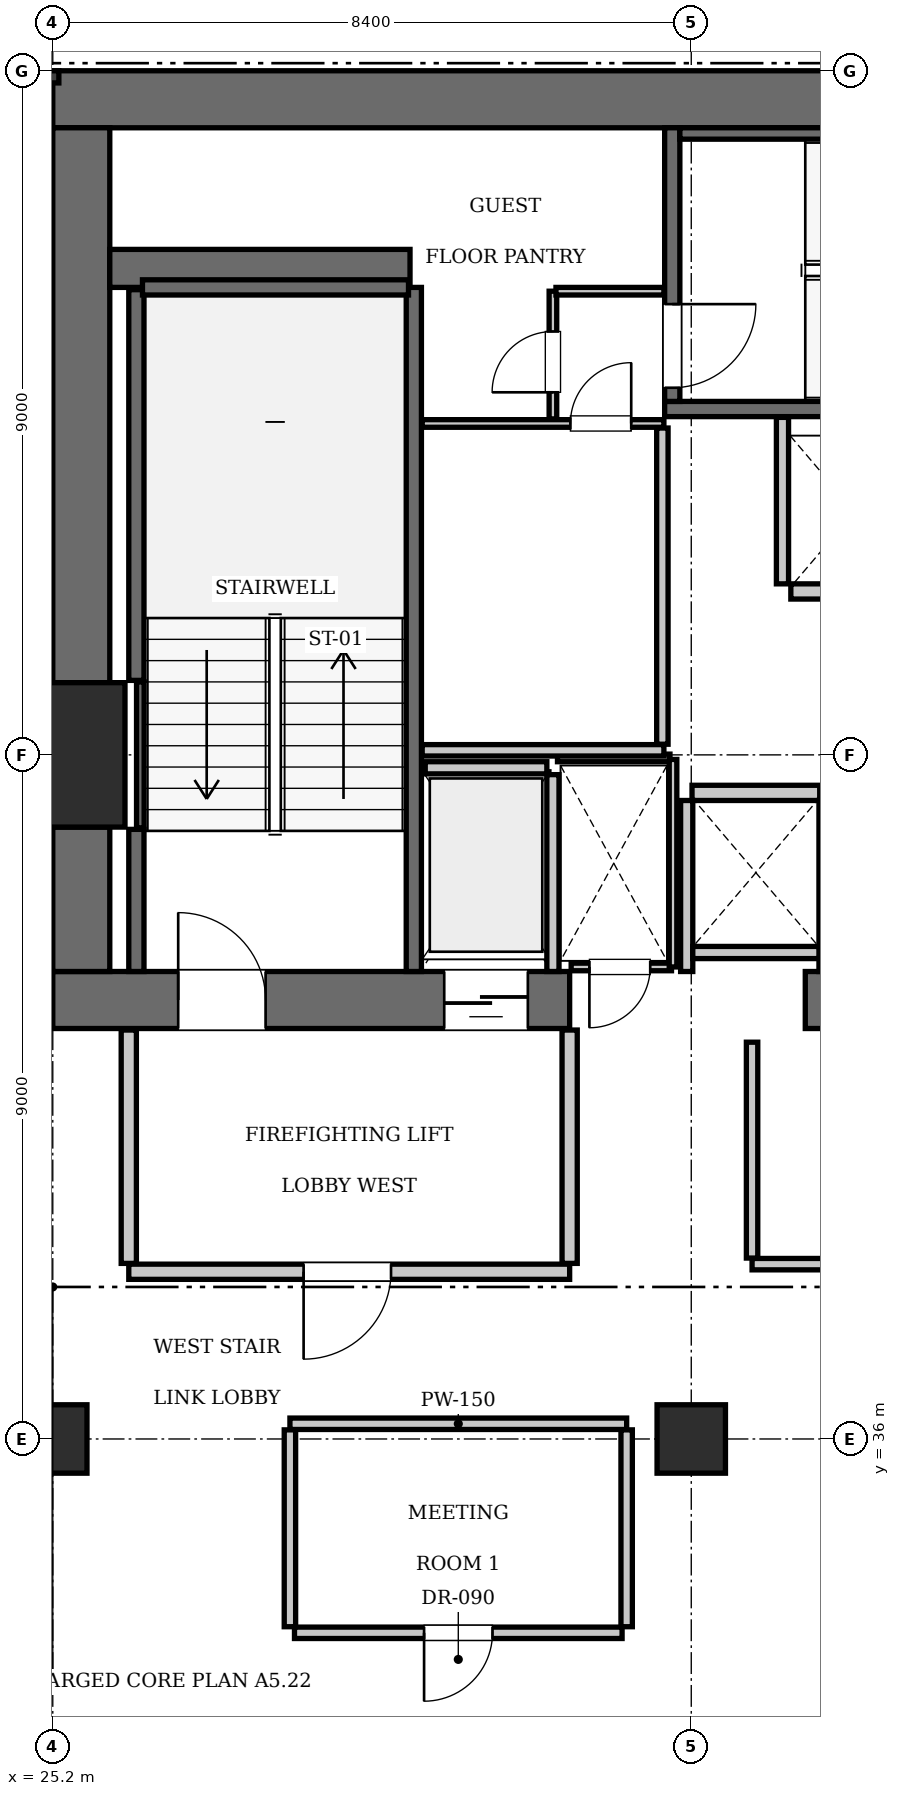
"""IFC4 building model, lengths in metres.
Left out: names, types, materials, properties, quantities, classifications, styles, units other than length and angle.
Written with IfcOpenShell. Run it as: python <this file> out.ifc"""

import sys

from ifc_helpers import new_model, si_unit, direction, frame, frame_2d, origin, origin_2d, place, context, subcontext, project, spatial, rectangle, extrude, element, fill, save


model = new_model("IFC4")
c1 = context("Model", 3, precision=1e-05, world=origin(), true_north=direction((0.0, 1.0)))
c2 = subcontext(c1, "Body", "Model", "MODEL_VIEW")
j1 = project(units=[si_unit("LENGTHUNIT", "METRE"), si_unit("PLANEANGLEUNIT", "RADIAN")], contexts=[c1])
p1 = place(None, origin())
s1 = spatial("IfcSite", under=j1, at=p1, CompositionType="ELEMENT")
p2 = place(p1, origin())
s2 = spatial("IfcBuilding", under=s1, at=p2, CompositionType="ELEMENT")
p3 = place(p2, frame((0.0, 0.0, 181.3)))
s3 = spatial("IfcBuildingStorey", under=s2, at=p3, CompositionType="ELEMENT", Elevation=181.3)
p4 = place(p3, frame((25.2, 45.0, 0.0), z_axis=(0.0, 0.0, 1.0), x_axis=(1.0, 0.0, 0.0)))
e1 = element("IfcColumn", 1, at=p4, inside=s3, PredefinedType="COLUMN", context=c2, shape_type="SweptSolid", body=[
    extrude(rectangle(XDim=1.9, YDim=1.9, at=origin_2d()), origin(), (0.0, 0.0, 1.0), 3.85),
])
p5 = place(p3, frame((25.2, 53.625, 0.0), z_axis=(0.0, 0.0, 1.0), x_axis=(1.0, 0.0, 0.0)))
e2 = element("IfcWall", 2, at=p5, inside=s3, PredefinedType="SHEAR", context=c2, shape_type="SweptSolid", body=[
    extrude(rectangle(XDim=25.2, YDim=0.75, at=frame_2d((12.6, 0.0))), origin(), (0.0, 0.0, 1.0), 3.85),
])
p6 = place(p3, frame((25.2, 41.775, 0.0), z_axis=(0.0, 0.0, 1.0), x_axis=(1.0, 0.0, 0.0)))
e3 = element("IfcWall", 3, at=p6, inside=s3, PredefinedType="SHEAR", context=c2, shape_type="SweptSolid", body=[
    extrude(rectangle(XDim=6.8, YDim=0.75, at=frame_2d((3.4, 0.0))), origin(), (0.0, 0.0, 1.0), 3.85),
])
p7 = place(p6, frame((1.65, 0.0, 0.0)))
e4 = element("IfcOpeningElement", 4, at=p7, cuts=e3, PredefinedType="OPENING", context=c2, shape_type="SweptSolid", body=[
    extrude(rectangle(XDim=1.15, YDim=2.15, at=frame_2d((0.575, 1.075))), frame((0.0, 0.385, 0.0), z_axis=(0.0, -1.0, 0.0), x_axis=(1.0, 0.0, 0.0)), (0.0, 0.0, 1.0), 0.77),
])
p8 = place(p6, frame((5.15, 0.0, 0.0)))
e5 = element("IfcOpeningElement", 5, at=p8, cuts=e3, PredefinedType="OPENING", context=c2, shape_type="SweptSolid", body=[
    extrude(rectangle(XDim=1.1, YDim=2.2, at=frame_2d((0.55, 1.1))), frame((0.0, 0.385, 0.0), z_axis=(0.0, -1.0, 0.0), x_axis=(1.0, 0.0, 0.0)), (0.0, 0.0, 1.0), 0.77),
])
p9 = place(p3, frame((35.1, 41.775, 0.0), z_axis=(0.0, 0.0, 1.0), x_axis=(1.0, 0.0, 0.0)))
e6 = element("IfcWall", 6, at=p9, inside=s3, PredefinedType="SHEAR", context=c2, shape_type="SweptSolid", body=[
    extrude(rectangle(XDim=5.4, YDim=0.75, at=frame_2d((2.7, 0.0))), origin(), (0.0, 0.0, 1.0), 3.85),
])
p10 = place(p3, frame((25.575, 42.15, 0.0), z_axis=(0.0, 0.0, 1.0), x_axis=(0.0, 1.0, 0.0)))
e7 = element("IfcWall", 7, at=p10, inside=s3, PredefinedType="SHEAR", context=c2, shape_type="SweptSolid", body=[
    extrude(rectangle(XDim=1.9, YDim=0.75, at=frame_2d((0.95, 0.0))), origin(), (0.0, 0.0, 1.0), 3.85),
])
p11 = place(p3, frame((25.575, 45.95, 0.0), z_axis=(0.0, 0.0, 1.0), x_axis=(0.0, 1.0, 0.0)))
e8 = element("IfcWall", 8, at=p11, inside=s3, PredefinedType="SHEAR", context=c2, shape_type="SweptSolid", body=[
    extrude(rectangle(XDim=7.3, YDim=0.75, at=frame_2d((3.65, 0.0))), origin(), (0.0, 0.0, 1.0), 3.85),
])
p12 = place(p3, frame((25.95, 51.4, 0.0), z_axis=(0.0, 0.0, 1.0), x_axis=(1.0, 0.0, 0.0)))
e9 = element("IfcWall", 9, at=p12, inside=s3, PredefinedType="SHEAR", context=c2, shape_type="SweptSolid", body=[
    extrude(rectangle(XDim=3.95, YDim=0.5, at=frame_2d((1.975, 0.0))), origin(), (0.0, 0.0, 1.0), 3.85),
])
for number, where, z_axis, x_axis in (
    (10, (25.2, 36.0, 0.0), (0.0, 0.0, 1.0), (1.0, 0.0, 0.0)),
    (11, (33.6, 36.0, 0.0), (0.0, 0.0, 1.0), (1.0, 0.0, 0.0)),
):
    element("IfcColumn", number, at=place(p3, frame(where, z_axis=z_axis, x_axis=x_axis)), inside=s3, PredefinedType="COLUMN", context=c2, shape_type="SweptSolid", body=[
        extrude(rectangle(XDim=0.9, YDim=0.9, at=origin_2d()), origin(), (0.0, 0.0, 1.0), 3.85),
    ])
p13 = place(p3, frame((29.95, 42.15, 0.0), z_axis=(0.0, 0.0, 1.0), x_axis=(0.0, 1.0, 0.0)))
e12 = element("IfcWall", 12, at=p13, inside=s3, PredefinedType="SOLIDWALL", context=c2, shape_type="SweptSolid", body=[
    extrude(rectangle(XDim=9.0, YDim=0.2, at=frame_2d((4.5, 0.0))), origin(), (0.0, 0.0, 1.0), 3.61),
])
p14 = place(p3, frame((26.3, 42.15, 0.0), z_axis=(0.0, 0.0, 1.0), x_axis=(0.0, 1.0, 0.0)))
e13 = element("IfcWall", 13, at=p14, inside=s3, PredefinedType="SOLIDWALL", context=c2, shape_type="SweptSolid", body=[
    extrude(rectangle(XDim=1.87, YDim=0.2, at=frame_2d((0.935, 0.0))), origin(), (0.0, 0.0, 1.0), 3.61),
])
p15 = place(p3, frame((26.3, 45.98, 0.0), z_axis=(0.0, 0.0, 1.0), x_axis=(0.0, 1.0, 0.0)))
e14 = element("IfcWall", 14, at=p15, inside=s3, PredefinedType="SOLIDWALL", context=c2, shape_type="SweptSolid", body=[
    extrude(rectangle(XDim=5.14, YDim=0.2, at=frame_2d((2.57, 0.0))), origin(), (0.0, 0.0, 1.0), 3.61),
])
p16 = place(p3, frame((26.38, 51.15, 0.0), z_axis=(0.0, 0.0, 1.0), x_axis=(1.0, 0.0, 0.0)))
e15 = element("IfcWall", 15, at=p16, inside=s3, PredefinedType="SOLIDWALL", context=c2, shape_type="SweptSolid", body=[
    extrude(rectangle(XDim=3.5, YDim=0.2, at=frame_2d((1.75, 0.0))), origin(), (0.0, 0.0, 1.0), 3.61),
])
p17 = place(p3, frame((26.352, 44.04, 0.0), z_axis=(0.0, 0.0, 1.0), x_axis=(0.0, 1.0, 0.0)))
e16 = element("IfcWall", 16, at=p17, inside=s3, PredefinedType="SOLIDWALL", context=c2, shape_type="SweptSolid", body=[
    extrude(rectangle(XDim=1.92, YDim=0.1, at=frame_2d((0.96, 0.0))), origin(), (0.0, 0.0, 1.0), 3.61),
])
p18 = place(p3, frame((33.25, 49.55, 0.0), z_axis=(0.0, 0.0, 1.0), x_axis=(1.0, 0.0, 0.0)))
e17 = element("IfcWall", 17, at=p18, inside=s3, PredefinedType="SOLIDWALL", context=c2, shape_type="SweptSolid", body=[
    extrude(rectangle(XDim=9.1, YDim=0.2, at=frame_2d((4.55, 0.0))), origin(), (0.0, 0.0, 1.0), 3.61),
])
p19 = place(p3, frame((33.35, 49.65, 0.0), z_axis=(0.0, 0.0, 1.0), x_axis=(0.0, 1.0, 0.0)))
e18 = element("IfcWall", 18, at=p19, inside=s3, PredefinedType="SOLIDWALL", context=c2, shape_type="SweptSolid", body=[
    extrude(rectangle(XDim=3.6, YDim=0.2, at=frame_2d((1.8, 0.0))), origin(), (0.0, 0.0, 1.0), 3.61),
])
p20 = place(p19, frame((0.18, 0.0, 0.0)))
e19 = element("IfcOpeningElement", 19, at=p20, cuts=e18, PredefinedType="OPENING", context=c2, shape_type="SweptSolid", body=[
    extrude(rectangle(XDim=1.1, YDim=2.15, at=frame_2d((0.55, 1.075))), frame((0.0, 0.11, 0.0), z_axis=(0.0, -1.0, 0.0), x_axis=(1.0, 0.0, 0.0)), (0.0, 0.0, 1.0), 0.22),
])
p21 = place(p3, frame((33.45, 53.175, 0.0), z_axis=(0.0, 0.0, 1.0), x_axis=(1.0, 0.0, 0.0)))
e20 = element("IfcWall", 20, at=p21, inside=s3, PredefinedType="SOLIDWALL", context=c2, shape_type="SweptSolid", body=[
    extrude(rectangle(XDim=8.7, YDim=0.15, at=frame_2d((4.35, 0.0))), origin(), (0.0, 0.0, 1.0), 3.61),
])
p22 = place(p3, frame((34.91, 47.15, 0.0), z_axis=(0.0, 0.0, 1.0), x_axis=(1.0, 0.0, 0.0)))
e21 = element("IfcWall", 21, at=p22, inside=s3, PredefinedType="SOLIDWALL", context=c2, shape_type="SweptSolid", body=[
    extrude(rectangle(XDim=1.68, YDim=0.2, at=frame_2d((0.84, 0.0))), origin(), (0.0, 0.0, 1.0), 3.61),
])
p23 = place(p3, frame((33.61, 44.5, 0.0), z_axis=(0.0, 0.0, 1.0), x_axis=(1.0, 0.0, 0.0)))
e22 = element("IfcWall", 22, at=p23, inside=s3, PredefinedType="SOLIDWALL", context=c2, shape_type="SweptSolid", body=[
    extrude(rectangle(XDim=1.68, YDim=0.2, at=frame_2d((0.84, 0.0))), origin(), (0.0, 0.0, 1.0), 3.61),
])
p24 = place(p3, frame((30.1, 44.83, 0.0), z_axis=(0.0, 0.0, 1.0), x_axis=(1.0, 0.0, 0.0)))
e23 = element("IfcWall", 23, at=p24, inside=s3, PredefinedType="SOLIDWALL", context=c2, shape_type="SweptSolid", body=[
    extrude(rectangle(XDim=1.6, YDim=0.16, at=frame_2d((0.8, 0.0))), origin(), (0.0, 0.0, 1.0), 3.61),
])
p25 = place(p3, frame((31.78, 42.15, 0.0), z_axis=(0.0, 0.0, 1.0), x_axis=(0.0, 1.0, 0.0)))
e24 = element("IfcWall", 24, at=p25, inside=s3, PredefinedType="SOLIDWALL", context=c2, shape_type="SweptSolid", body=[
    extrude(rectangle(XDim=2.59, YDim=0.16, at=frame_2d((1.295, 0.0))), origin(), (0.0, 0.0, 1.0), 3.61),
])
p26 = place(p3, frame((34.8, 47.25, 0.0), z_axis=(0.0, 0.0, 1.0), x_axis=(0.0, 1.0, 0.0)))
e25 = element("IfcWall", 25, at=p26, inside=s3, PredefinedType="SOLIDWALL", context=c2, shape_type="SweptSolid", body=[
    extrude(rectangle(XDim=2.19, YDim=0.16, at=frame_2d((1.095, 0.0))), origin(), (0.0, 0.0, 1.0), 3.61),
])
for number, where, z_axis, x_axis in (
    (26, (33.54, 42.15, 0.0), (0.0, 0.0, 1.0), (0.0, 1.0, 0.0)),
    (27, (35.36, 42.15, 0.0), (0.0, 0.0, 1.0), (0.0, 1.0, 0.0)),
):
    element("IfcWall", number, at=place(p3, frame(where, z_axis=z_axis, x_axis=x_axis)), inside=s3, PredefinedType="SOLIDWALL", context=c2, shape_type="SweptSolid", body=[
        extrude(rectangle(XDim=2.25, YDim=0.16, at=frame_2d((1.125, 0.0))), origin(), (0.0, 0.0, 1.0), 3.61),
    ])
p27 = place(p3, frame((33.62, 42.4, 0.0), z_axis=(0.0, 0.0, 1.0), x_axis=(1.0, 0.0, 0.0)))
e28 = element("IfcWall", 28, at=p27, inside=s3, PredefinedType="SOLIDWALL", context=c2, shape_type="SweptSolid", body=[
    extrude(rectangle(XDim=1.66, YDim=0.16, at=frame_2d((0.83, 0.0))), origin(), (0.0, 0.0, 1.0), 3.61),
])
p28 = place(p3, frame((26.2, 38.2, 0.0), z_axis=(0.0, 0.0, 1.0), x_axis=(1.0, 0.0, 0.0)))
e29 = element("IfcWall", 29, at=p28, inside=s3, PredefinedType="PARTITIONING", context=c2, shape_type="SweptSolid", body=[
    extrude(rectangle(XDim=5.8, YDim=0.2, at=frame_2d((2.9, 0.0))), origin(), (0.0, 0.0, 1.0), 3.61),
])
p29 = place(p28, frame((2.3, 0.0, 0.0)))
e30 = element("IfcOpeningElement", 30, at=p29, cuts=e29, PredefinedType="OPENING", context=c2, shape_type="SweptSolid", body=[
    extrude(rectangle(XDim=1.15, YDim=2.15, at=frame_2d((0.575, 1.075))), frame((0.0, 0.11, 0.0), z_axis=(0.0, -1.0, 0.0), x_axis=(1.0, 0.0, 0.0)), (0.0, 0.0, 1.0), 0.22),
])
for number, where, z_axis, x_axis in (
    (31, (26.2, 38.31, 0.0), (0.0, 0.0, 1.0), (0.0, 1.0, 0.0)),
    (32, (32.0, 38.31, 0.0), (0.0, 0.0, 1.0), (0.0, 1.0, 0.0)),
):
    element("IfcWall", number, at=place(p3, frame(where, z_axis=z_axis, x_axis=x_axis)), inside=s3, PredefinedType="PARTITIONING", context=c2, shape_type="SweptSolid", body=[
        extrude(rectangle(XDim=3.07, YDim=0.2, at=frame_2d((1.535, 0.0))), origin(), (0.0, 0.0, 1.0), 3.61),
    ])
p30 = place(p3, frame((32.02, 42.21, 0.0), z_axis=(0.0, 0.0, 1.0), x_axis=(1.0, 0.0, 0.0)))
e33 = element("IfcWall", 33, at=p30, inside=s3, PredefinedType="PARTITIONING", context=c2, shape_type="SweptSolid", body=[
    extrude(rectangle(XDim=1.32, YDim=0.1, at=frame_2d((0.66, 0.0))), origin(), (0.0, 0.0, 1.0), 3.61),
])
p31 = place(p30, frame((0.24, 0.0, 0.0)))
e34 = element("IfcOpeningElement", 34, at=p31, cuts=e33, PredefinedType="OPENING", context=c2, shape_type="SweptSolid", body=[
    extrude(rectangle(XDim=0.8, YDim=2.05, at=frame_2d((0.4, 1.025))), frame((0.0, 0.06, 0.0), z_axis=(0.0, -1.0, 0.0), x_axis=(1.0, 0.0, 0.0)), (0.0, 0.0, 1.0), 0.12),
])
p32 = place(p3, frame((31.84, 44.96, 0.0), z_axis=(0.0, 0.0, 1.0), x_axis=(1.0, 0.0, 0.0)))
e35 = element("IfcWall", 35, at=p32, inside=s3, PredefinedType="PARTITIONING", context=c2, shape_type="SweptSolid", body=[
    extrude(rectangle(XDim=1.48, YDim=0.1, at=frame_2d((0.74, 0.0))), origin(), (0.0, 0.0, 1.0), 3.61),
])
p33 = place(p3, frame((33.36, 42.21, 0.0), z_axis=(0.0, 0.0, 1.0), x_axis=(0.0, 1.0, 0.0)))
e36 = element("IfcWall", 36, at=p33, inside=s3, PredefinedType="PARTITIONING", context=c2, shape_type="SweptSolid", body=[
    extrude(rectangle(XDim=2.73, YDim=0.1, at=frame_2d((1.365, 0.0))), origin(), (0.0, 0.0, 1.0), 3.61),
])
p34 = place(p3, frame((30.06, 45.06, 0.0), z_axis=(0.0, 0.0, 1.0), x_axis=(1.0, 0.0, 0.0)))
e37 = element("IfcWall", 37, at=p34, inside=s3, PredefinedType="PARTITIONING", context=c2, shape_type="SweptSolid", body=[
    extrude(rectangle(XDim=3.18, YDim=0.15, at=frame_2d((1.59, 0.0))), origin(), (0.0, 0.0, 1.0), 3.61),
])
p35 = place(p3, frame((33.22, 45.14, 0.0), z_axis=(0.0, 0.0, 1.0), x_axis=(0.0, 1.0, 0.0)))
e38 = element("IfcWall", 38, at=p35, inside=s3, PredefinedType="PARTITIONING", context=c2, shape_type="SweptSolid", body=[
    extrude(rectangle(XDim=4.16, YDim=0.15, at=frame_2d((2.08, 0.0))), origin(), (0.0, 0.0, 1.0), 3.61),
])
p36 = place(p3, frame((30.06, 49.36, 0.0), z_axis=(0.0, 0.0, 1.0), x_axis=(1.0, 0.0, 0.0)))
e39 = element("IfcWall", 39, at=p36, inside=s3, PredefinedType="PARTITIONING", context=c2, shape_type="SweptSolid", body=[
    extrude(rectangle(XDim=3.18, YDim=0.1, at=frame_2d((1.59, 0.0))), origin(), (0.0, 0.0, 1.0), 3.61),
])
p37 = place(p36, frame((1.95, 0.0, 0.0)))
e40 = element("IfcOpeningElement", 40, at=p37, cuts=e39, PredefinedType="OPENING", context=c2, shape_type="SweptSolid", body=[
    extrude(rectangle(XDim=0.8, YDim=2.05, at=frame_2d((0.4, 1.025))), frame((0.0, 0.06, 0.0), z_axis=(0.0, -1.0, 0.0), x_axis=(1.0, 0.0, 0.0)), (0.0, 0.0, 1.0), 0.12),
])
p38 = place(p3, frame((31.78, 49.42, 0.0), z_axis=(0.0, 0.0, 1.0), x_axis=(0.0, 1.0, 0.0)))
e41 = element("IfcWall", 41, at=p38, inside=s3, PredefinedType="PARTITIONING", context=c2, shape_type="SweptSolid", body=[
    extrude(rectangle(XDim=1.68, YDim=0.1, at=frame_2d((0.84, 0.0))), origin(), (0.0, 0.0, 1.0), 3.61),
])
p39 = place(p38, frame((0.35, 0.0, 0.0)))
e42 = element("IfcOpeningElement", 42, at=p39, cuts=e41, PredefinedType="OPENING", context=c2, shape_type="SweptSolid", body=[
    extrude(rectangle(XDim=0.8, YDim=2.05, at=frame_2d((0.4, 1.025))), frame((0.0, 0.06, 0.0), z_axis=(0.0, -1.0, 0.0), x_axis=(1.0, 0.0, 0.0)), (0.0, 0.0, 1.0), 0.12),
])
p40 = place(p3, frame((31.82, 51.1, 0.0), z_axis=(0.0, 0.0, 1.0), x_axis=(1.0, 0.0, 0.0)))
e43 = element("IfcWall", 43, at=p40, inside=s3, PredefinedType="PARTITIONING", context=c2, shape_type="SweptSolid", body=[
    extrude(rectangle(XDim=1.42, YDim=0.1, at=frame_2d((0.71, 0.0))), origin(), (0.0, 0.0, 1.0), 3.61),
])
p41 = place(p3, frame((34.4, 38.3, 0.0), z_axis=(0.0, 0.0, 1.0), x_axis=(1.0, 0.0, 0.0)))
e44 = element("IfcWall", 44, at=p41, inside=s3, PredefinedType="PARTITIONING", context=c2, shape_type="SweptSolid", body=[
    extrude(rectangle(XDim=2.88, YDim=0.15, at=frame_2d((1.44, 0.0))), origin(), (0.0, 0.0, 1.0), 3.61),
])
p42 = place(p41, frame((1.0, 0.0, 0.0)))
e45 = element("IfcOpeningElement", 45, at=p42, cuts=e44, PredefinedType="OPENING", context=c2, shape_type="SweptSolid", body=[
    extrude(rectangle(XDim=0.8, YDim=2.05, at=frame_2d((0.4, 1.025))), frame((0.0, 0.085, 0.0), z_axis=(0.0, -1.0, 0.0), x_axis=(1.0, 0.0, 0.0)), (0.0, 0.0, 1.0), 0.17),
])
p43 = place(p3, frame((34.4, 38.38, 0.0), z_axis=(0.0, 0.0, 1.0), x_axis=(0.0, 1.0, 0.0)))
e46 = element("IfcWall", 46, at=p43, inside=s3, PredefinedType="PARTITIONING", context=c2, shape_type="SweptSolid", body=[
    extrude(rectangle(XDim=2.84, YDim=0.15, at=frame_2d((1.42, 0.0))), origin(), (0.0, 0.0, 1.0), 3.61),
])
p44 = place(p3, frame((28.32, 36.2, 0.0), z_axis=(0.0, 0.0, 1.0), x_axis=(1.0, 0.0, 0.0)))
e47 = element("IfcWall", 47, at=p44, inside=s3, PredefinedType="PARTITIONING", context=c2, shape_type="SweptSolid", body=[
    extrude(rectangle(XDim=4.43, YDim=0.15, at=frame_2d((2.215, 0.0))), origin(), (0.0, 0.0, 1.0), 3.61),
])
for number, where, z_axis, x_axis in (
    (48, (28.32, 33.53, 0.0), (0.0, 0.0, 1.0), (0.0, 1.0, 0.0)),
    (49, (32.75, 33.53, 0.0), (0.0, 0.0, 1.0), (0.0, 1.0, 0.0)),
):
    element("IfcWall", number, at=place(p3, frame(where, z_axis=z_axis, x_axis=x_axis)), inside=s3, PredefinedType="PARTITIONING", context=c2, shape_type="SweptSolid", body=[
        extrude(rectangle(XDim=2.59, YDim=0.15, at=frame_2d((1.295, 0.0))), origin(), (0.0, 0.0, 1.0), 3.61),
    ])
p45 = place(p3, frame((28.38, 33.45, 0.0), z_axis=(0.0, 0.0, 1.0), x_axis=(1.0, 0.0, 0.0)))
e50 = element("IfcWall", 50, at=p45, inside=s3, PredefinedType="PARTITIONING", context=c2, shape_type="SweptSolid", body=[
    extrude(rectangle(XDim=4.31, YDim=0.15, at=frame_2d((2.155, 0.0))), origin(), (0.0, 0.0, 1.0), 3.61),
])
p46 = place(p45, frame((1.705, 0.0, 0.0)))
e51 = element("IfcOpeningElement", 51, at=p46, cuts=e50, PredefinedType="OPENING", context=c2, shape_type="SweptSolid", body=[
    extrude(rectangle(XDim=0.9, YDim=2.1, at=frame_2d((0.45, 1.05))), frame((0.0, 0.085, 0.0), z_axis=(0.0, -1.0, 0.0), x_axis=(1.0, 0.0, 0.0)), (0.0, 0.0, 1.0), 0.17),
])
p47 = place(p7, origin())
e52 = element("IfcDoor", 52, at=p47, inside=s3, OperationType="SINGLE_SWING_LEFT", PredefinedType="DOOR", context=c2, shape_type="SweptSolid", body=[
    extrude(rectangle(XDim=1.15, YDim=2.15, at=frame_2d((0.575, 1.075))), frame((0.0, 0.025, 0.0), z_axis=(0.0, -1.0, 0.0), x_axis=(1.0, 0.0, 0.0)), (0.0, 0.0, 1.0), 0.05),
])
fill(e4, e52)
p48 = place(p20, frame((1.1, 0.0, 0.0), z_axis=(0.0, 0.0, 1.0), x_axis=(-1.0, 0.0, 0.0)))
e53 = element("IfcDoor", 53, at=p48, inside=s3, OperationType="SINGLE_SWING_LEFT", PredefinedType="DOOR", context=c2, shape_type="SweptSolid", body=[
    extrude(rectangle(XDim=1.1, YDim=2.15, at=frame_2d((0.55, 1.075))), frame((0.0, 0.025, 0.0), z_axis=(0.0, -1.0, 0.0), x_axis=(1.0, 0.0, 0.0)), (0.0, 0.0, 1.0), 0.05),
])
fill(e19, e53)
p49 = place(p8, frame((1.1, 0.0, 0.0), z_axis=(0.0, 0.0, 1.0), x_axis=(-1.0, 0.0, 0.0)))
e54 = element("IfcDoor", 54, at=p49, inside=s3, OperationType="SLIDING_TO_LEFT", PredefinedType="DOOR", context=c2, shape_type="SweptSolid", body=[
    extrude(rectangle(XDim=1.1, YDim=2.2, at=frame_2d((0.55, 1.1))), frame((0.0, 0.025, 0.0), z_axis=(0.0, -1.0, 0.0), x_axis=(1.0, 0.0, 0.0)), (0.0, 0.0, 1.0), 0.05),
])
fill(e5, e54)
p50 = place(p29, frame((1.15, 0.0, 0.0), z_axis=(0.0, 0.0, 1.0), x_axis=(-1.0, 0.0, 0.0)))
e55 = element("IfcDoor", 55, at=p50, inside=s3, OperationType="SINGLE_SWING_RIGHT", PredefinedType="DOOR", context=c2, shape_type="SweptSolid", body=[
    extrude(rectangle(XDim=1.15, YDim=2.15, at=frame_2d((0.575, 1.075))), frame((0.0, 0.025, 0.0), z_axis=(0.0, -1.0, 0.0), x_axis=(1.0, 0.0, 0.0)), (0.0, 0.0, 1.0), 0.05),
])
fill(e30, e55)
p51 = place(p31, frame((0.8, 0.0, 0.0), z_axis=(0.0, 0.0, 1.0), x_axis=(-1.0, 0.0, 0.0)))
e56 = element("IfcDoor", 56, at=p51, inside=s3, OperationType="SINGLE_SWING_RIGHT", PredefinedType="DOOR", context=c2, shape_type="SweptSolid", body=[
    extrude(rectangle(XDim=0.8, YDim=2.05, at=frame_2d((0.4, 1.025))), frame((0.0, 0.025, 0.0), z_axis=(0.0, -1.0, 0.0), x_axis=(1.0, 0.0, 0.0)), (0.0, 0.0, 1.0), 0.05),
])
fill(e34, e56)
p52 = place(p37, origin())
e57 = element("IfcDoor", 57, at=p52, inside=s3, OperationType="SINGLE_SWING_RIGHT", PredefinedType="DOOR", context=c2, shape_type="SweptSolid", body=[
    extrude(rectangle(XDim=0.8, YDim=2.05, at=frame_2d((0.4, 1.025))), frame((0.0, 0.025, 0.0), z_axis=(0.0, -1.0, 0.0), x_axis=(1.0, 0.0, 0.0)), (0.0, 0.0, 1.0), 0.05),
])
fill(e40, e57)
p53 = place(p39, origin())
e58 = element("IfcDoor", 58, at=p53, inside=s3, OperationType="SINGLE_SWING_LEFT", PredefinedType="DOOR", context=c2, shape_type="SweptSolid", body=[
    extrude(rectangle(XDim=0.8, YDim=2.05, at=frame_2d((0.4, 1.025))), frame((0.0, 0.025, 0.0), z_axis=(0.0, -1.0, 0.0), x_axis=(1.0, 0.0, 0.0)), (0.0, 0.0, 1.0), 0.05),
])
fill(e42, e58)
p54 = place(p46, frame((0.9, 0.0, 0.0), z_axis=(0.0, 0.0, 1.0), x_axis=(-1.0, 0.0, 0.0)))
e59 = element("IfcDoor", 59, at=p54, inside=s3, OperationType="SINGLE_SWING_RIGHT", PredefinedType="DOOR", context=c2, shape_type="SweptSolid", body=[
    extrude(rectangle(XDim=0.9, YDim=2.1, at=frame_2d((0.45, 1.05))), frame((0.0, 0.025, 0.0), z_axis=(0.0, -1.0, 0.0), x_axis=(1.0, 0.0, 0.0)), (0.0, 0.0, 1.0), 0.05),
])
fill(e51, e59)
save(model, sys.argv[1])
